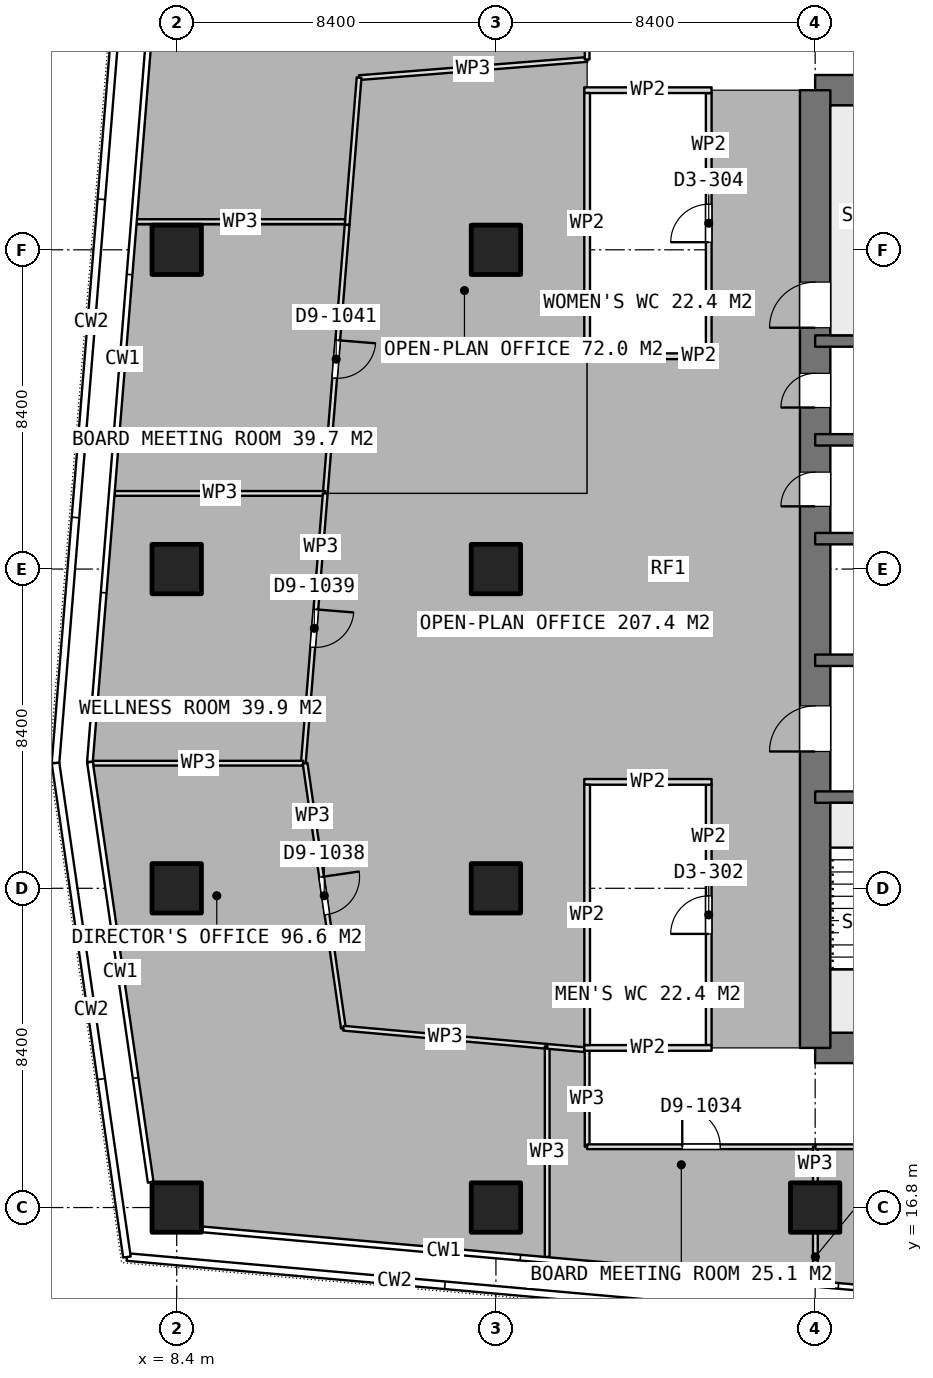
"""IFC4 building model, lengths in metres.
Left out: names, types, materials, properties, quantities, classifications, styles, units other than length and angle.
Written with IfcOpenShell. Run it as: python <this file> out.ifc"""

import sys

from ifc_helpers import new_model, si_unit, direction, frame, frame_2d, origin, origin_2d, place, context, subcontext, project, spatial, rectangle, extrude, element, fill, save


model = new_model("IFC4")
c1 = context("Model", 3, precision=1e-05, world=origin(), true_north=direction((0.0, 1.0)))
c2 = subcontext(c1, "Body", "Model", "MODEL_VIEW")
j1 = project(units=[si_unit("LENGTHUNIT", "METRE"), si_unit("PLANEANGLEUNIT", "RADIAN")], contexts=[c1])
p1 = place(None, origin())
s1 = spatial("IfcSite", under=j1, at=p1, CompositionType="ELEMENT")
p2 = place(p1, origin())
s2 = spatial("IfcBuilding", under=s1, at=p2, CompositionType="ELEMENT")
p3 = place(p2, frame((0.0, 0.0, 280.1)))
s3 = spatial("IfcBuildingStorey", under=s2, at=p3, CompositionType="ELEMENT", Elevation=280.1)
for number, where, z_axis, x_axis in (
    (1, (25.2, 21.0, 0.0), (0.0, 0.0, 1.0), (1.0, 0.0, 0.0)),
    (2, (25.2, 46.2, 0.0), (0.0, 0.0, 1.0), (1.0, 0.0, 0.0)),
):
    element("IfcWall", number, at=place(p3, frame(where, z_axis=z_axis, x_axis=x_axis)), inside=s3, PredefinedType="SHEAR", context=c2, shape_type="SweptSolid", body=[
        extrude(rectangle(XDim=10.4, YDim=0.8, at=frame_2d((5.2, 0.0))), origin(), (0.0, 0.0, 1.0), 3.75),
    ])
p4 = place(p3, frame((25.2, 21.0, 0.0), z_axis=(0.0, 0.0, 1.0), x_axis=(0.0, 1.0, 0.0)))
e3 = element("IfcWall", 3, at=p4, inside=s3, PredefinedType="SHEAR", context=c2, shape_type="SweptSolid", body=[
    extrude(rectangle(XDim=25.2, YDim=0.8, at=frame_2d((12.6, 0.0))), origin(), (0.0, 0.0, 1.0), 3.75),
])
p5 = place(p4, frame((7.8, 0.0, 0.0)))
e4 = element("IfcOpeningElement", 4, at=p5, cuts=e3, PredefinedType="OPENING", context=c2, shape_type="SweptSolid", body=[
    extrude(rectangle(XDim=1.2, YDim=2.1, at=frame_2d((0.6, 1.05))), frame((0.0, 0.41, 0.0), z_axis=(0.0, -1.0, 0.0), x_axis=(1.0, 0.0, 0.0)), (0.0, 0.0, 1.0), 0.82),
])
p6 = place(p4, frame((14.25, 0.0, 0.0)))
e5 = element("IfcOpeningElement", 5, at=p6, cuts=e3, PredefinedType="OPENING", context=c2, shape_type="SweptSolid", body=[
    extrude(rectangle(XDim=0.9, YDim=2.1, at=frame_2d((0.45, 1.05))), frame((0.0, 0.41, 0.0), z_axis=(0.0, -1.0, 0.0), x_axis=(1.0, 0.0, 0.0)), (0.0, 0.0, 1.0), 0.82),
])
p7 = place(p4, frame((16.85, 0.0, 0.0)))
e6 = element("IfcOpeningElement", 6, at=p7, cuts=e3, PredefinedType="OPENING", context=c2, shape_type="SweptSolid", body=[
    extrude(rectangle(XDim=0.9, YDim=2.1, at=frame_2d((0.45, 1.05))), frame((0.0, 0.41, 0.0), z_axis=(0.0, -1.0, 0.0), x_axis=(1.0, 0.0, 0.0)), (0.0, 0.0, 1.0), 0.82),
])
p8 = place(p4, frame((18.95, 0.0, 0.0)))
e7 = element("IfcOpeningElement", 7, at=p8, cuts=e3, PredefinedType="OPENING", context=c2, shape_type="SweptSolid", body=[
    extrude(rectangle(XDim=1.2, YDim=2.1, at=frame_2d((0.6, 1.05))), frame((0.0, 0.41, 0.0), z_axis=(0.0, -1.0, 0.0), x_axis=(1.0, 0.0, 0.0)), (0.0, 0.0, 1.0), 0.82),
])
p9 = place(p3, frame((25.2, 27.6, 0.0), z_axis=(0.0, 0.0, 1.0), x_axis=(1.0, 0.0, 0.0)))
e8 = element("IfcWall", 8, at=p9, inside=s3, PredefinedType="SHEAR", context=c2, shape_type="SweptSolid", body=[
    extrude(rectangle(XDim=6.6, YDim=0.3, at=frame_2d((3.3, 0.0))), origin(), (0.0, 0.0, 1.0), 3.75),
])
p10 = place(p9, frame((5.05, 0.0, 0.0)))
e9 = element("IfcOpeningElement", 9, at=p10, cuts=e8, PredefinedType="OPENING", context=c2, shape_type="SweptSolid", body=[
    extrude(rectangle(XDim=1.2, YDim=2.1, at=frame_2d((0.6, 1.05))), frame((0.0, 0.16, 0.0), z_axis=(0.0, -1.0, 0.0), x_axis=(1.0, 0.0, 0.0)), (0.0, 0.0, 1.0), 0.32),
])
p11 = place(p3, frame((25.2, 31.2, 0.0), z_axis=(0.0, 0.0, 1.0), x_axis=(1.0, 0.0, 0.0)))
e10 = element("IfcWall", 10, at=p11, inside=s3, PredefinedType="SHEAR", context=c2, shape_type="SweptSolid", body=[
    extrude(rectangle(XDim=6.6, YDim=0.3, at=frame_2d((3.3, 0.0))), origin(), (0.0, 0.0, 1.0), 3.75),
])
p12 = place(p11, frame((2.65, 0.0, 0.0)))
e11 = element("IfcOpeningElement", 11, at=p12, cuts=e10, PredefinedType="OPENING", context=c2, shape_type="SweptSolid", body=[
    extrude(rectangle(XDim=1.3, YDim=2.1, at=frame_2d((0.65, 1.05))), frame((0.0, 0.16, 0.0), z_axis=(0.0, -1.0, 0.0), x_axis=(1.0, 0.0, 0.0)), (0.0, 0.0, 1.0), 0.32),
])
for number, where, z_axis, x_axis in (
    (12, (25.2, 34.4, 0.0), (0.0, 0.0, 1.0), (1.0, 0.0, 0.0)),
    (13, (25.2, 37.0, 0.0), (0.0, 0.0, 1.0), (1.0, 0.0, 0.0)),
    (14, (25.2, 39.6, 0.0), (0.0, 0.0, 1.0), (1.0, 0.0, 0.0)),
):
    element("IfcWall", number, at=place(p3, frame(where, z_axis=z_axis, x_axis=x_axis)), inside=s3, PredefinedType="SHEAR", context=c2, shape_type="SweptSolid", body=[
        extrude(rectangle(XDim=6.6, YDim=0.3, at=frame_2d((3.3, 0.0))), origin(), (0.0, 0.0, 1.0), 3.75),
    ])
for number, where, z_axis, x_axis in (
    (15, (8.4, 16.8, 0.0), (0.0, 0.0, 1.0), (1.0, 0.0, 0.0)),
    (16, (8.4, 25.2, 0.0), (0.0, 0.0, 1.0), (1.0, 0.0, 0.0)),
    (17, (8.4, 33.6, 0.0), (0.0, 0.0, 1.0), (1.0, 0.0, 0.0)),
    (18, (8.4, 42.0, 0.0), (0.0, 0.0, 1.0), (1.0, 0.0, 0.0)),
    (19, (16.8, 16.8, 0.0), (0.0, 0.0, 1.0), (1.0, 0.0, 0.0)),
    (20, (16.8, 25.2, 0.0), (0.0, 0.0, 1.0), (1.0, 0.0, 0.0)),
    (21, (16.8, 33.6, 0.0), (0.0, 0.0, 1.0), (1.0, 0.0, 0.0)),
    (22, (16.8, 42.0, 0.0), (0.0, 0.0, 1.0), (1.0, 0.0, 0.0)),
    (23, (25.2, 16.8, 0.0), (0.0, 0.0, 1.0), (1.0, 0.0, 0.0)),
):
    element("IfcColumn", number, at=place(p3, frame(where, z_axis=z_axis, x_axis=x_axis)), inside=s3, PredefinedType="COLUMN", context=c2, shape_type="SweptSolid", body=[
        extrude(rectangle(XDim=1.3, YDim=1.3, at=origin_2d()), origin(), (0.0, 0.0, 1.0), 3.75),
    ])
for number, where, z_axis, x_axis in (
    (24, (19.125, 39.2, 0.0), (0.0, 0.0, 1.0), (1.0, 0.0, 0.0)),
    (25, (19.125, 46.2, 0.0), (0.0, 0.0, 1.0), (1.0, 0.0, 0.0)),
):
    element("IfcWall", number, at=place(p3, frame(where, z_axis=z_axis, x_axis=x_axis)), inside=s3, PredefinedType="PARTITIONING", context=c2, shape_type="SweptSolid", body=[
        extrude(rectangle(XDim=3.35, YDim=0.15, at=frame_2d((1.675, 0.0))), origin(), (0.0, 0.0, 1.0), 3.5),
    ])
p13 = place(p3, frame((19.2, 39.275, 0.0), z_axis=(0.0, 0.0, 1.0), x_axis=(0.0, 1.0, 0.0)))
e26 = element("IfcWall", 26, at=p13, inside=s3, PredefinedType="PARTITIONING", context=c2, shape_type="SweptSolid", body=[
    extrude(rectangle(XDim=6.85, YDim=0.15, at=frame_2d((3.425, 0.0))), origin(), (0.0, 0.0, 1.0), 3.5),
])
p14 = place(p3, frame((22.4, 39.275, 0.0), z_axis=(0.0, 0.0, 1.0), x_axis=(0.0, 1.0, 0.0)))
e27 = element("IfcWall", 27, at=p14, inside=s3, PredefinedType="PARTITIONING", context=c2, shape_type="SweptSolid", body=[
    extrude(rectangle(XDim=6.85, YDim=0.15, at=frame_2d((3.425, 0.0))), origin(), (0.0, 0.0, 1.0), 3.5),
])
p15 = place(p14, frame((2.925, 0.0, 0.0)))
e28 = element("IfcOpeningElement", 28, at=p15, cuts=e27, PredefinedType="OPENING", context=c2, shape_type="SweptSolid", body=[
    extrude(rectangle(XDim=1.0, YDim=2.1, at=frame_2d((0.5, 1.05))), frame((0.0, 0.085, 0.0), z_axis=(0.0, -1.0, 0.0), x_axis=(1.0, 0.0, 0.0)), (0.0, 0.0, 1.0), 0.17),
])
for number, where, z_axis, x_axis in (
    (29, (19.125, 21.0, 0.0), (0.0, 0.0, 1.0), (1.0, 0.0, 0.0)),
    (30, (19.125, 28.0, 0.0), (0.0, 0.0, 1.0), (1.0, 0.0, 0.0)),
):
    element("IfcWall", number, at=place(p3, frame(where, z_axis=z_axis, x_axis=x_axis)), inside=s3, PredefinedType="PARTITIONING", context=c2, shape_type="SweptSolid", body=[
        extrude(rectangle(XDim=3.35, YDim=0.15, at=frame_2d((1.675, 0.0))), origin(), (0.0, 0.0, 1.0), 3.5),
    ])
p16 = place(p3, frame((19.2, 21.075, 0.0), z_axis=(0.0, 0.0, 1.0), x_axis=(0.0, 1.0, 0.0)))
e31 = element("IfcWall", 31, at=p16, inside=s3, PredefinedType="PARTITIONING", context=c2, shape_type="SweptSolid", body=[
    extrude(rectangle(XDim=6.85, YDim=0.15, at=frame_2d((3.425, 0.0))), origin(), (0.0, 0.0, 1.0), 3.5),
])
p17 = place(p3, frame((22.4, 21.075, 0.0), z_axis=(0.0, 0.0, 1.0), x_axis=(0.0, 1.0, 0.0)))
e32 = element("IfcWall", 32, at=p17, inside=s3, PredefinedType="PARTITIONING", context=c2, shape_type="SweptSolid", body=[
    extrude(rectangle(XDim=6.85, YDim=0.15, at=frame_2d((3.425, 0.0))), origin(), (0.0, 0.0, 1.0), 3.5),
])
p18 = place(p17, frame((2.925, 0.0, 0.0)))
e33 = element("IfcOpeningElement", 33, at=p18, cuts=e32, PredefinedType="OPENING", context=c2, shape_type="SweptSolid", body=[
    extrude(rectangle(XDim=1.0, YDim=2.1, at=frame_2d((0.5, 1.05))), frame((0.0, 0.085, 0.0), z_axis=(0.0, -1.0, 0.0), x_axis=(1.0, 0.0, 0.0)), (0.0, 0.0, 1.0), 0.17),
])
p19 = place(p3, frame((19.2, 47.008, 0.0), z_axis=(0.0, 0.0, 1.0), x_axis=(-0.996842300725, -0.079406721921, 0.0)))
e34 = element("IfcWall", 34, at=p19, inside=s3, PredefinedType="PARTITIONING", context=c2, shape_type="SweptSolid", body=[
    extrude(rectangle(XDim=6.02, YDim=0.125, at=frame_2d((3.01, 0.0))), origin(), (0.0, 0.0, 1.0), 3.5),
])
p20 = place(p3, frame((13.199, 46.53, 0.0), z_axis=(0.0, 0.0, 1.0), x_axis=(-0.081048669132, -0.996710145043, 0.0)))
e35 = element("IfcWall", 35, at=p20, inside=s3, PredefinedType="PARTITIONING", context=c2, shape_type="SweptSolid", body=[
    extrude(rectangle(XDim=3.886, YDim=0.125, at=frame_2d((1.943, 0.0))), origin(), (0.0, 0.0, 1.0), 3.5),
])
p21 = place(p3, frame((12.828, 42.742, 0.0), z_axis=(0.0, 0.0, 1.0), x_axis=(-1.0, 0.0, 0.0)))
e36 = element("IfcWall", 36, at=p21, inside=s3, PredefinedType="PARTITIONING", context=c2, shape_type="SweptSolid", body=[
    extrude(rectangle(XDim=5.505, YDim=0.125, at=frame_2d((2.752, 0.0))), origin(), (0.0, 0.0, 1.0), 3.5),
])
p22 = place(p3, frame((19.2, 49.15, 0.0), z_axis=(0.0, 0.0, 1.0), x_axis=(0.0, -1.0, 0.0)))
e37 = element("IfcWall", 37, at=p22, inside=s3, PredefinedType="PARTITIONING", context=c2, shape_type="SweptSolid", body=[
    extrude(rectangle(XDim=2.142, YDim=0.125, at=frame_2d((1.071, 0.0))), origin(), (0.0, 0.0, 1.0), 3.5),
])
p23 = place(p22, frame((0.571, 0.0, 0.0)))
e38 = element("IfcOpeningElement", 38, at=p23, cuts=e37, PredefinedType="OPENING", context=c2, shape_type="SweptSolid", body=[
    extrude(rectangle(XDim=1.0, YDim=2.1, at=frame_2d((0.5, 1.05))), frame((0.0, 0.073, 0.0), z_axis=(0.0, -1.0, 0.0), x_axis=(1.0, 0.0, 0.0)), (0.0, 0.0, 1.0), 0.145),
])
p24 = place(p3, frame((12.884, 42.656, 0.0), z_axis=(0.0, 0.0, 1.0), x_axis=(-0.08110159124, -0.996705840205, 0.0)))
e39 = element("IfcWall", 39, at=p24, inside=s3, PredefinedType="PARTITIONING", context=c2, shape_type="SweptSolid", body=[
    extrude(rectangle(XDim=7.089, YDim=0.125, at=frame_2d((3.545, 0.0))), origin(), (0.0, 0.0, 1.0), 3.5),
])
p25 = place(p24, frame((3.045, 0.0, 0.0)))
e40 = element("IfcOpeningElement", 40, at=p25, cuts=e39, PredefinedType="OPENING", context=c2, shape_type="SweptSolid", body=[
    extrude(rectangle(XDim=1.0, YDim=2.1, at=frame_2d((0.5, 1.05))), frame((0.0, 0.073, 0.0), z_axis=(0.0, -1.0, 0.0), x_axis=(1.0, 0.0, 0.0)), (0.0, 0.0, 1.0), 0.145),
])
p26 = place(p3, frame((12.309, 35.59, 0.0), z_axis=(0.0, 0.0, 1.0), x_axis=(-1.0, 0.0, 0.0)))
e41 = element("IfcWall", 41, at=p26, inside=s3, PredefinedType="PARTITIONING", context=c2, shape_type="SweptSolid", body=[
    extrude(rectangle(XDim=5.538, YDim=0.125, at=frame_2d((2.769, 0.0))), origin(), (0.0, 0.0, 1.0), 3.5),
])
p27 = place(p3, frame((12.309, 35.589, 0.0), z_axis=(0.0, 0.0, 1.0), x_axis=(-0.081053384124, -0.996709761627, 0.0)))
e42 = element("IfcWall", 42, at=p27, inside=s3, PredefinedType="PARTITIONING", context=c2, shape_type="SweptSolid", body=[
    extrude(rectangle(XDim=7.121, YDim=0.125, at=frame_2d((3.56, 0.0))), origin(), (0.0, 0.0, 1.0), 3.5),
])
p28 = place(p27, frame((3.06, 0.0, 0.0)))
e43 = element("IfcOpeningElement", 43, at=p28, cuts=e42, PredefinedType="OPENING", context=c2, shape_type="SweptSolid", body=[
    extrude(rectangle(XDim=1.0, YDim=2.1, at=frame_2d((0.5, 1.05))), frame((0.0, 0.073, 0.0), z_axis=(0.0, -1.0, 0.0), x_axis=(1.0, 0.0, 0.0)), (0.0, 0.0, 1.0), 0.145),
])
p29 = place(p3, frame((11.732, 28.492, 0.0), z_axis=(0.0, 0.0, 1.0), x_axis=(-1.0, 0.0, 0.0)))
e44 = element("IfcWall", 44, at=p29, inside=s3, PredefinedType="PARTITIONING", context=c2, shape_type="SweptSolid", body=[
    extrude(rectangle(XDim=5.531, YDim=0.125, at=frame_2d((2.766, 0.0))), origin(), (0.0, 0.0, 1.0), 3.5),
])
p30 = place(p3, frame((11.779, 28.488, 0.0), z_axis=(0.0, 0.0, 1.0), x_axis=(0.143139230014, -0.989702561799, 0.0)))
e45 = element("IfcWall", 45, at=p30, inside=s3, PredefinedType="PARTITIONING", context=c2, shape_type="SweptSolid", body=[
    extrude(rectangle(XDim=7.042, YDim=0.125, at=frame_2d((3.521, 0.0))), origin(), (0.0, 0.0, 1.0), 3.5),
])
p31 = place(p30, frame((3.02, 0.0, 0.0)))
e46 = element("IfcOpeningElement", 46, at=p31, cuts=e45, PredefinedType="OPENING", context=c2, shape_type="SweptSolid", body=[
    extrude(rectangle(XDim=1.0, YDim=2.1, at=frame_2d((0.5, 1.05))), frame((0.0, 0.073, 0.0), z_axis=(0.0, -1.0, 0.0), x_axis=(1.0, 0.0, 0.0)), (0.0, 0.0, 1.0), 0.145),
])
p32 = place(p3, frame((12.787, 21.518, 0.0), z_axis=(0.0, 0.0, 1.0), x_axis=(0.996065348673, -0.088621787237, 0.0)))
e47 = element("IfcWall", 47, at=p32, inside=s3, PredefinedType="PARTITIONING", context=c2, shape_type="SweptSolid", body=[
    extrude(rectangle(XDim=5.383, YDim=0.125, at=frame_2d((2.691, 0.0))), origin(), (0.0, 0.0, 1.0), 3.5),
])
p33 = place(p3, frame((18.149, 21.041, 0.0), z_axis=(0.0, 0.0, 1.0), x_axis=(0.0, -1.0, 0.0)))
e48 = element("IfcWall", 48, at=p33, inside=s3, PredefinedType="PARTITIONING", context=c2, shape_type="SweptSolid", body=[
    extrude(rectangle(XDim=5.541, YDim=0.125, at=frame_2d((2.771, 0.0))), origin(), (0.0, 0.0, 1.0), 3.5),
])
p34 = place(p3, frame((18.15, 21.041, 0.0), z_axis=(0.0, 0.0, 1.0), x_axis=(0.996138836376, -0.087791905459, 0.0)))
e49 = element("IfcWall", 49, at=p34, inside=s3, PredefinedType="PARTITIONING", context=c2, shape_type="SweptSolid", body=[
    extrude(rectangle(XDim=0.979, YDim=0.125, at=frame_2d((0.489, 0.0))), origin(), (0.0, 0.0, 1.0), 3.5),
])
p35 = place(p3, frame((19.2, 20.925, 0.0), z_axis=(0.0, 0.0, 1.0), x_axis=(0.0, -1.0, 0.0)))
e50 = element("IfcWall", 50, at=p35, inside=s3, PredefinedType="PARTITIONING", context=c2, shape_type="SweptSolid", body=[
    extrude(rectangle(XDim=2.525, YDim=0.125, at=frame_2d((1.263, 0.0))), origin(), (0.0, 0.0, 1.0), 3.5),
])
p36 = place(p3, frame((19.2, 18.4, 0.0), z_axis=(0.0, 0.0, 1.0), x_axis=(1.0, 0.0, 0.0)))
e51 = element("IfcWall", 51, at=p36, inside=s3, PredefinedType="PARTITIONING", context=c2, shape_type="SweptSolid", body=[
    extrude(rectangle(XDim=6.006, YDim=0.125, at=frame_2d((3.003, 0.0))), origin(), (0.0, 0.0, 1.0), 3.5),
])
p37 = place(p36, frame((2.503, 0.0, 0.0)))
e52 = element("IfcOpeningElement", 52, at=p37, cuts=e51, PredefinedType="OPENING", context=c2, shape_type="SweptSolid", body=[
    extrude(rectangle(XDim=1.0, YDim=2.1, at=frame_2d((0.5, 1.05))), frame((0.0, 0.073, 0.0), z_axis=(0.0, -1.0, 0.0), x_axis=(1.0, 0.0, 0.0)), (0.0, 0.0, 1.0), 0.145),
])
p38 = place(p3, frame((25.206, 18.4, 0.0), z_axis=(0.0, 0.0, 1.0), x_axis=(0.0, -1.0, 0.0)))
e53 = element("IfcWall", 53, at=p38, inside=s3, PredefinedType="PARTITIONING", context=c2, shape_type="SweptSolid", body=[
    extrude(rectangle(XDim=0.93, YDim=0.125, at=frame_2d((0.465, 0.0))), origin(), (0.0, 0.0, 1.0), 3.5),
])
p39 = place(p3, frame((25.206, 16.13, 0.0), z_axis=(0.0, 0.0, 1.0), x_axis=(0.0, -1.0, 0.0)))
e54 = element("IfcWall", 54, at=p39, inside=s3, PredefinedType="PARTITIONING", context=c2, shape_type="SweptSolid", body=[
    extrude(rectangle(XDim=1.258, YDim=0.125, at=frame_2d((0.629, 0.0))), origin(), (0.0, 0.0, 1.0), 3.5),
])
p40 = place(p3, frame((25.207, 18.4, 0.0), z_axis=(0.0, 0.0, 1.0), x_axis=(1.0, 0.0, 0.0)))
e55 = element("IfcWall", 55, at=p40, inside=s3, PredefinedType="PARTITIONING", context=c2, shape_type="SweptSolid", body=[
    extrude(rectangle(XDim=10.391, YDim=0.125, at=frame_2d((5.195, 0.0))), origin(), (0.0, 0.0, 1.0), 3.5),
])
p41 = place(p40, frame((4.695, 0.0, 0.0)))
e56 = element("IfcOpeningElement", 56, at=p41, cuts=e55, PredefinedType="OPENING", context=c2, shape_type="SweptSolid", body=[
    extrude(rectangle(XDim=1.0, YDim=2.1, at=frame_2d((0.5, 1.05))), frame((0.0, 0.073, 0.0), z_axis=(0.0, -1.0, 0.0), x_axis=(1.0, 0.0, 0.0)), (0.0, 0.0, 1.0), 0.145),
])
p42 = place(p5, origin())
e57 = element("IfcDoor", 57, at=p42, inside=s3, OperationType="SINGLE_SWING_LEFT", PredefinedType="DOOR", context=c2, shape_type="SweptSolid", body=[
    extrude(rectangle(XDim=1.2, YDim=2.1, at=frame_2d((0.6, 1.05))), frame((0.0, 0.025, 0.0), z_axis=(0.0, -1.0, 0.0), x_axis=(1.0, 0.0, 0.0)), (0.0, 0.0, 1.0), 0.05),
])
fill(e4, e57)
p43 = place(p6, origin())
e58 = element("IfcDoor", 58, at=p43, inside=s3, OperationType="SINGLE_SWING_LEFT", PredefinedType="DOOR", context=c2, shape_type="SweptSolid", body=[
    extrude(rectangle(XDim=0.9, YDim=2.1, at=frame_2d((0.45, 1.05))), frame((0.0, 0.025, 0.0), z_axis=(0.0, -1.0, 0.0), x_axis=(1.0, 0.0, 0.0)), (0.0, 0.0, 1.0), 0.05),
])
fill(e5, e58)
p44 = place(p7, origin())
e59 = element("IfcDoor", 59, at=p44, inside=s3, OperationType="SINGLE_SWING_LEFT", PredefinedType="DOOR", context=c2, shape_type="SweptSolid", body=[
    extrude(rectangle(XDim=0.9, YDim=2.1, at=frame_2d((0.45, 1.05))), frame((0.0, 0.025, 0.0), z_axis=(0.0, -1.0, 0.0), x_axis=(1.0, 0.0, 0.0)), (0.0, 0.0, 1.0), 0.05),
])
fill(e6, e59)
p45 = place(p15, origin())
e60 = element("IfcDoor", 60, at=p45, inside=s3, OperationType="SINGLE_SWING_LEFT", PredefinedType="DOOR", context=c2, shape_type="SweptSolid", body=[
    extrude(rectangle(XDim=1.0, YDim=2.1, at=frame_2d((0.5, 1.05))), frame((0.0, 0.025, 0.0), z_axis=(0.0, -1.0, 0.0), x_axis=(1.0, 0.0, 0.0)), (0.0, 0.0, 1.0), 0.05),
])
fill(e28, e60)
p46 = place(p18, origin())
e61 = element("IfcDoor", 61, at=p46, inside=s3, OperationType="SINGLE_SWING_LEFT", PredefinedType="DOOR", context=c2, shape_type="SweptSolid", body=[
    extrude(rectangle(XDim=1.0, YDim=2.1, at=frame_2d((0.5, 1.05))), frame((0.0, 0.025, 0.0), z_axis=(0.0, -1.0, 0.0), x_axis=(1.0, 0.0, 0.0)), (0.0, 0.0, 1.0), 0.05),
])
fill(e33, e61)
p47 = place(p25, origin())
e62 = element("IfcDoor", 62, at=p47, inside=s3, OperationType="SINGLE_SWING_LEFT", PredefinedType="DOOR", context=c2, shape_type="SweptSolid", body=[
    extrude(rectangle(XDim=1.0, YDim=2.1, at=frame_2d((0.5, 1.05))), frame((0.0, 0.025, 0.0), z_axis=(0.0, -1.0, 0.0), x_axis=(1.0, 0.0, 0.0)), (0.0, 0.0, 1.0), 0.05),
])
fill(e40, e62)
p48 = place(p28, origin())
e63 = element("IfcDoor", 63, at=p48, inside=s3, OperationType="SINGLE_SWING_LEFT", PredefinedType="DOOR", context=c2, shape_type="SweptSolid", body=[
    extrude(rectangle(XDim=1.0, YDim=2.1, at=frame_2d((0.5, 1.05))), frame((0.0, 0.025, 0.0), z_axis=(0.0, -1.0, 0.0), x_axis=(1.0, 0.0, 0.0)), (0.0, 0.0, 1.0), 0.05),
])
fill(e43, e63)
p49 = place(p31, origin())
e64 = element("IfcDoor", 64, at=p49, inside=s3, OperationType="SINGLE_SWING_LEFT", PredefinedType="DOOR", context=c2, shape_type="SweptSolid", body=[
    extrude(rectangle(XDim=1.0, YDim=2.1, at=frame_2d((0.5, 1.05))), frame((0.0, 0.025, 0.0), z_axis=(0.0, -1.0, 0.0), x_axis=(1.0, 0.0, 0.0)), (0.0, 0.0, 1.0), 0.05),
])
fill(e46, e64)
p50 = place(p37, origin())
e65 = element("IfcDoor", 65, at=p50, inside=s3, OperationType="SINGLE_SWING_LEFT", PredefinedType="DOOR", context=c2, shape_type="SweptSolid", body=[
    extrude(rectangle(XDim=1.0, YDim=2.1, at=frame_2d((0.5, 1.05))), frame((0.0, 0.025, 0.0), z_axis=(0.0, -1.0, 0.0), x_axis=(1.0, 0.0, 0.0)), (0.0, 0.0, 1.0), 0.05),
])
fill(e52, e65)
p51 = place(p8, origin())
e66 = element("IfcDoor", 66, at=p51, inside=s3, OperationType="SINGLE_SWING_RIGHT", PredefinedType="DOOR", context=c2, shape_type="SweptSolid", body=[
    extrude(rectangle(XDim=1.2, YDim=2.1, at=frame_2d((0.6, 1.05))), frame((0.0, 0.025, 0.0), z_axis=(0.0, -1.0, 0.0), x_axis=(1.0, 0.0, 0.0)), (0.0, 0.0, 1.0), 0.05),
])
fill(e7, e66)
save(model, sys.argv[1])
